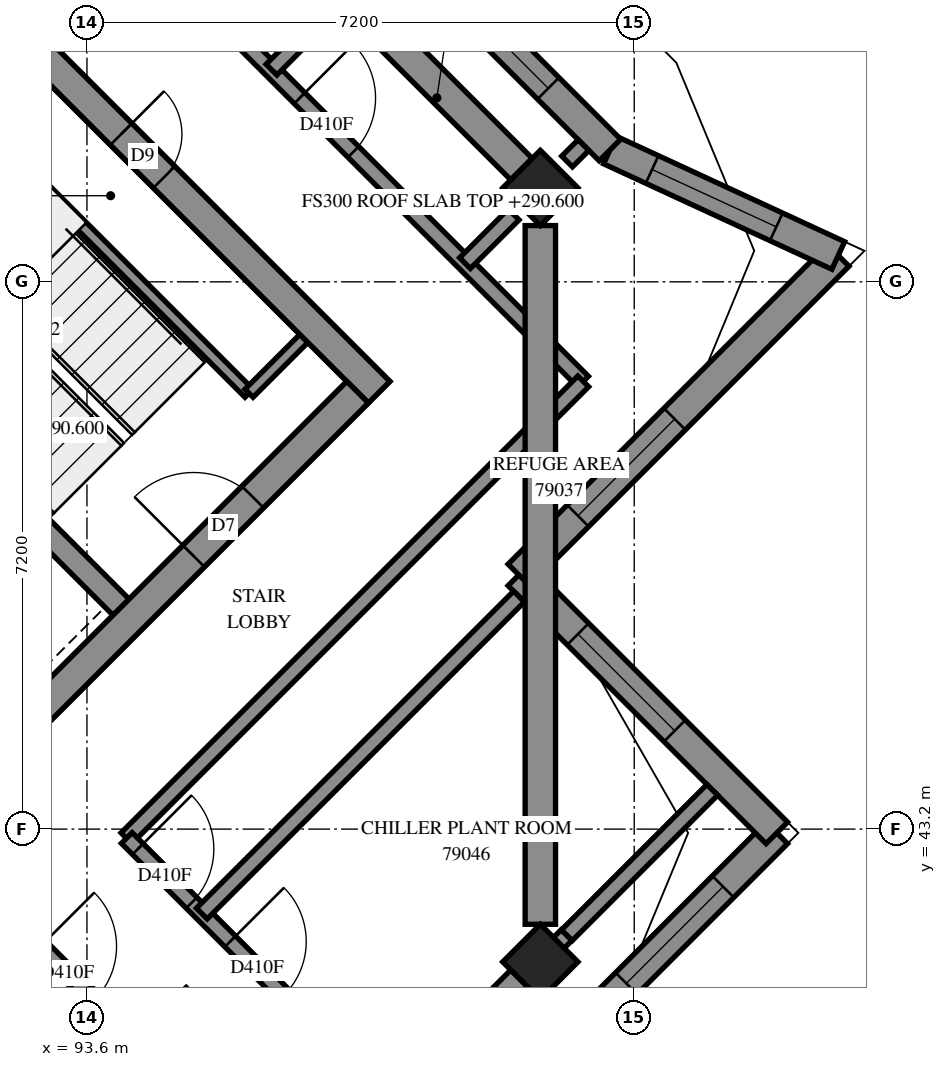
"""IFC4 building model, lengths in metres.
Left out: names, types, materials, properties, quantities, classifications, styles, units other than length and angle.
Written with IfcOpenShell. Run it as: python <this file> out.ifc"""

import sys

from ifc_helpers import new_model, si_unit, direction, frame, frame_2d, origin, origin_2d, place, context, subcontext, project, spatial, polyline, rectangle, outline, extrude, element, fill, save


model = new_model("IFC4")
c1 = context("Model", 3, precision=1e-05, world=origin(), true_north=direction((0.0, 1.0)))
c2 = subcontext(c1, "Body", "Model", "MODEL_VIEW")
j1 = project(units=[si_unit("LENGTHUNIT", "METRE"), si_unit("PLANEANGLEUNIT", "RADIAN")], contexts=[c1])
p1 = place(None, origin())
s1 = spatial("IfcSite", under=j1, at=p1, CompositionType="ELEMENT")
p2 = place(p1, origin())
s2 = spatial("IfcBuilding", under=s1, at=p2, CompositionType="ELEMENT")
p3 = place(p2, frame((0.0, 0.0, 290.6)))
s3 = spatial("IfcBuildingStorey", under=s2, at=p3, CompositionType="ELEMENT", Elevation=290.6)
for number, where, z_axis, x_axis in (
    (1, (99.565, 51.635, 0.0), (0.0, 0.0, 1.0), (0.707, -0.707, 0.0)),
    (2, (99.565, 41.453, 0.0), (0.0, 0.0, 1.0), (0.707, -0.707, 0.0)),
):
    element("IfcColumn", number, at=place(p3, frame(where, z_axis=z_axis, x_axis=x_axis)), inside=s3, PredefinedType="COLUMN", context=c2, shape_type="SweptSolid", body=[
        extrude(rectangle(XDim=0.7, YDim=0.7, at=origin_2d()), origin(), (0.0, 0.0, 1.0), 3.5),
    ])
p4 = place(p3, frame((86.695, 59.696, -0.3), z_axis=(0.0, 0.0, 1.0), x_axis=(0.7071100706, -0.7071034917, 0.0)))
e3 = element("IfcWall", 3, at=p4, inside=s3, PredefinedType="SHEAR", context=c2, shape_type="SweptSolid", body=[
    extrude(rectangle(XDim=15.2, YDim=0.4, at=frame_2d((7.6, 0.0))), origin(), (0.0, 0.0, 1.0), 3.1),
])
p5 = place(p4, frame((10.4, 0.0, 0.3)))
e4 = element("IfcOpeningElement", 4, at=p5, cuts=e3, PredefinedType="OPENING", context=c2, shape_type="SweptSolid", body=[
    extrude(rectangle(XDim=0.8, YDim=2.1, at=frame_2d((0.4, 1.05))), frame((0.0, 0.21, 0.0), z_axis=(0.0, -1.0, 0.0), x_axis=(1.0, 0.0, 0.0)), (0.0, 0.0, 1.0), 0.42),
])
p6 = place(p3, frame((86.978, 38.766, -0.3), z_axis=(0.0, 0.0, 1.0), x_axis=(0.7071067812, 0.7071067812, 0.0)))
e5 = element("IfcWall", 5, at=p6, inside=s3, PredefinedType="SHEAR", context=c2, shape_type="SweptSolid", body=[
    extrude(rectangle(XDim=14.4, YDim=0.4, at=frame_2d((7.2, 0.0))), origin(), (0.0, 0.0, 1.0), 3.1),
])
p7 = place(p6, frame((4.55, 0.0, 0.3)))
e6 = element("IfcOpeningElement", 6, at=p7, cuts=e5, PredefinedType="OPENING", context=c2, shape_type="SweptSolid", body=[
    extrude(rectangle(XDim=1.1, YDim=2.1, at=frame_2d((0.55, 1.05))), frame((0.0, 0.21, 0.0), z_axis=(0.0, -1.0, 0.0), x_axis=(1.0, 0.0, 0.0)), (0.0, 0.0, 1.0), 0.42),
])
p8 = place(p6, frame((11.35, 0.0, 0.3)))
e7 = element("IfcOpeningElement", 7, at=p8, cuts=e5, PredefinedType="OPENING", context=c2, shape_type="SweptSolid", body=[
    extrude(rectangle(XDim=1.1, YDim=2.1, at=frame_2d((0.55, 1.05))), frame((0.0, 0.21, 0.0), z_axis=(0.0, -1.0, 0.0), x_axis=(1.0, 0.0, 0.0)), (0.0, 0.0, 1.0), 0.42),
])
p9 = place(p3, frame((88.958, 51.211, 0.0), z_axis=(0.0, 0.0, 1.0), x_axis=(0.7070998367, -0.7071137256, 0.0)))
e8 = element("IfcWall", 8, at=p9, inside=s3, PredefinedType="SOLIDWALL", context=c2, shape_type="SweptSolid", body=[
    extrude(rectangle(XDim=7.2, YDim=0.3, at=frame_2d((3.6, 0.0))), origin(), (0.0, 0.0, 1.0), 3.5),
])
p10 = place(p3, frame((89.382, 29.856, 0.0), z_axis=(0.0, 0.0, 1.0), x_axis=(0.7071094407, 0.7071041216, 0.0)))
e9 = element("IfcWall", 9, at=p10, inside=s3, PredefinedType="SOLIDWALL", context=c2, shape_type="SweptSolid", body=[
    extrude(outline(polyline([(-0.2, -0.2), (19.0, -0.2), (18.6, 0.2), (0.2, 0.2), (-0.2, -0.2)])), origin(), (0.0, 0.0, 1.0), 3.0),
])
p11 = place(p10, frame((1.9, 0.0, 0.7)))
e10 = element("IfcOpeningElement", 10, at=p11, cuts=e9, PredefinedType="OPENING", context=c2, shape_type="SweptSolid", body=[
    extrude(rectangle(XDim=1.8, YDim=2.2, at=frame_2d((0.9, 1.1))), frame((0.0, 0.21, 0.0), z_axis=(0.0, -1.0, 0.0), x_axis=(1.0, 0.0, 0.0)), (0.0, 0.0, 1.0), 0.42),
])
p12 = place(p10, frame((5.5, 0.0, 0.7)))
e11 = element("IfcOpeningElement", 11, at=p12, cuts=e9, PredefinedType="OPENING", context=c2, shape_type="SweptSolid", body=[
    extrude(rectangle(XDim=1.8, YDim=2.2, at=frame_2d((0.9, 1.1))), frame((0.0, 0.21, 0.0), z_axis=(0.0, -1.0, 0.0), x_axis=(1.0, 0.0, 0.0)), (0.0, 0.0, 1.0), 0.42),
])
p13 = place(p10, frame((8.95, 0.0, 0.7)))
e12 = element("IfcOpeningElement", 12, at=p13, cuts=e9, PredefinedType="OPENING", context=c2, shape_type="SweptSolid", body=[
    extrude(rectangle(XDim=1.8, YDim=2.2, at=frame_2d((0.9, 1.1))), frame((0.0, 0.21, 0.0), z_axis=(0.0, -1.0, 0.0), x_axis=(1.0, 0.0, 0.0)), (0.0, 0.0, 1.0), 0.42),
])
p14 = place(p10, frame((12.85, 0.0, 0.7)))
e13 = element("IfcOpeningElement", 13, at=p14, cuts=e9, PredefinedType="OPENING", context=c2, shape_type="SweptSolid", body=[
    extrude(rectangle(XDim=1.8, YDim=2.2, at=frame_2d((0.9, 1.1))), frame((0.0, 0.21, 0.0), z_axis=(0.0, -1.0, 0.0), x_axis=(1.0, 0.0, 0.0)), (0.0, 0.0, 1.0), 0.42),
])
p15 = place(p10, frame((16.0, 0.0, 0.7)))
e14 = element("IfcOpeningElement", 14, at=p15, cuts=e9, PredefinedType="OPENING", context=c2, shape_type="SweptSolid", body=[
    extrude(rectangle(XDim=1.8, YDim=2.2, at=frame_2d((0.9, 1.1))), frame((0.0, 0.21, 0.0), z_axis=(0.0, -1.0, 0.0), x_axis=(1.0, 0.0, 0.0)), (0.0, 0.0, 1.0), 0.42),
])
p16 = place(p3, frame((102.676, 43.15, 0.0), z_axis=(0.0, 0.0, 1.0), x_axis=(-0.7070963646, 0.7071171977, 0.0)))
e15 = element("IfcWall", 15, at=p16, inside=s3, PredefinedType="SOLIDWALL", context=c2, shape_type="SweptSolid", body=[
    extrude(outline(polyline([(-0.2, -0.2), (4.6, -0.2), (5.0, 0.2), (0.2, 0.2), (-0.2, -0.2)])), origin(), (0.0, 0.0, 1.0), 3.5),
])
p17 = place(p16, frame((1.9, 0.0, 0.7)))
e16 = element("IfcOpeningElement", 16, at=p17, cuts=e15, PredefinedType="OPENING", context=c2, shape_type="SweptSolid", body=[
    extrude(rectangle(XDim=1.8, YDim=2.2, at=frame_2d((0.9, 1.1))), frame((0.0, 0.21, 0.0), z_axis=(0.0, -1.0, 0.0), x_axis=(1.0, 0.0, 0.0)), (0.0, 0.0, 1.0), 0.42),
])
p18 = place(p3, frame((99.282, 46.544, 0.0), z_axis=(0.0, 0.0, 1.0), x_axis=(0.7071067812, 0.7071067812, 0.0)))
e17 = element("IfcWall", 17, at=p18, inside=s3, PredefinedType="SOLIDWALL", context=c2, shape_type="SweptSolid", body=[
    extrude(outline(polyline([(0.2, -0.2), (6.23, -0.2), (5.657, 0.2), (-0.2, 0.2), (0.2, -0.2)])), origin(), (0.0, 0.0, 1.0), 3.5),
])
p19 = place(p18, frame((1.1, 0.0, 0.7)))
e18 = element("IfcOpeningElement", 18, at=p19, cuts=e17, PredefinedType="OPENING", context=c2, shape_type="SweptSolid", body=[
    extrude(rectangle(XDim=1.8, YDim=2.2, at=frame_2d((0.9, 1.1))), frame((0.0, 0.21, 0.0), z_axis=(0.0, -1.0, 0.0), x_axis=(1.0, 0.0, 0.0)), (0.0, 0.0, 1.0), 0.42),
])
p20 = place(p3, frame((103.484, 50.747, 0.0), z_axis=(0.0, 0.0, 1.0), x_axis=(-0.9078558767, 0.4192823716, 0.0)))
e19 = element("IfcWall", 19, at=p20, inside=s3, PredefinedType="SOLIDWALL", context=c2, shape_type="SweptSolid", body=[
    extrude(outline(polyline([(-0.287, -0.2), (3.273, -0.2), (3.345, 0.2), (0.287, 0.2), (-0.287, -0.2)])), origin(), (0.0, 0.0, 1.0), 3.5),
])
p21 = place(p20, frame((0.898, 0.0, 0.7)))
e20 = element("IfcOpeningElement", 20, at=p21, cuts=e19, PredefinedType="OPENING", context=c2, shape_type="SweptSolid", body=[
    extrude(rectangle(XDim=1.8, YDim=2.2, at=frame_2d((0.9, 1.1))), frame((0.0, 0.21, 0.0), z_axis=(0.0, -1.0, 0.0), x_axis=(1.0, 0.0, 0.0)), (0.0, 0.0, 1.0), 0.42),
])
p22 = place(p3, frame((100.48, 52.134, 0.0), z_axis=(0.0, 0.0, 1.0), x_axis=(-0.7071067812, 0.7071067812, 0.0)))
e21 = element("IfcWall", 21, at=p22, inside=s3, PredefinedType="SOLIDWALL", context=c2, shape_type="SweptSolid", body=[
    extrude(outline(polyline([(0.036, -0.2), (6.718, -0.2), (6.718, 0.2), (-0.036, 0.2), (0.036, -0.2)])), origin(), (0.0, 0.0, 1.0), 3.5),
])
p23 = place(p22, frame((1.147, 0.0, 0.7)))
e22 = element("IfcOpeningElement", 22, at=p23, cuts=e21, PredefinedType="OPENING", context=c2, shape_type="SweptSolid", body=[
    extrude(rectangle(XDim=1.8, YDim=2.2, at=frame_2d((0.9, 1.1))), frame((0.0, 0.21, 0.0), z_axis=(0.0, -1.0, 0.0), x_axis=(1.0, 0.0, 0.0)), (0.0, 0.0, 1.0), 0.42),
])
p24 = place(p22, frame((4.306, 0.0, 0.7)))
e23 = element("IfcOpeningElement", 23, at=p24, cuts=e21, PredefinedType="OPENING", context=c2, shape_type="SweptSolid", body=[
    extrude(rectangle(XDim=1.8, YDim=2.2, at=frame_2d((0.9, 1.1))), frame((0.0, 0.21, 0.0), z_axis=(0.0, -1.0, 0.0), x_axis=(1.0, 0.0, 0.0)), (0.0, 0.0, 1.0), 0.42),
])
p25 = place(p3, frame((91.313, 53.354, 0.0), z_axis=(0.0, 0.0, 1.0), x_axis=(0.7071147811, -0.7070987812, 0.0)))
e24 = element("IfcWall", 24, at=p25, inside=s3, PredefinedType="PARTITIONING", context=c2, shape_type="SweptSolid", body=[
    extrude(rectangle(XDim=6.25, YDim=0.15, at=frame_2d((3.125, 0.0))), origin(), (0.0, 0.0, 1.0), 3.5),
])
p26 = place(p3, frame((95.732, 48.934, 0.0), z_axis=(0.0, 0.0, 1.0), x_axis=(0.7071067812, 0.7071067812, 0.0)))
e25 = element("IfcWall", 25, at=p26, inside=s3, PredefinedType="PARTITIONING", context=c2, shape_type="SweptSolid", body=[
    extrude(rectangle(XDim=1.02, YDim=0.15, at=frame_2d((0.51, 0.0))), origin(), (0.0, 0.0, 1.0), 3.5),
])
p27 = place(p3, frame((86.833, 62.381, 0.0), z_axis=(0.0, 0.0, 1.0), x_axis=(0.7071067812, -0.7071067812, 0.0)))
e26 = element("IfcWall", 26, at=p27, inside=s3, PredefinedType="PARTITIONING", context=c2, shape_type="SweptSolid", body=[
    extrude(rectangle(XDim=18.801, YDim=0.2, at=frame_2d((9.4, 0.0))), origin(), (0.0, 0.0, 1.0), 3.5),
])
p28 = place(p27, frame((4.276, 0.0, 0.0)))
e27 = element("IfcOpeningElement", 27, at=p28, cuts=e26, PredefinedType="OPENING", context=c2, shape_type="SweptSolid", body=[
    extrude(rectangle(XDim=1.0, YDim=2.1, at=frame_2d((0.5, 1.05))), frame((0.0, 0.11, 0.0), z_axis=(0.0, -1.0, 0.0), x_axis=(1.0, 0.0, 0.0)), (0.0, 0.0, 1.0), 0.22),
])
p29 = place(p27, frame((6.326, 0.0, 0.0)))
e28 = element("IfcOpeningElement", 28, at=p29, cuts=e26, PredefinedType="OPENING", context=c2, shape_type="SweptSolid", body=[
    extrude(rectangle(XDim=1.0, YDim=2.1, at=frame_2d((0.5, 1.05))), frame((0.0, 0.11, 0.0), z_axis=(0.0, -1.0, 0.0), x_axis=(1.0, 0.0, 0.0)), (0.0, 0.0, 1.0), 0.22),
])
p30 = place(p27, frame((11.476, 0.0, 0.0)))
e29 = element("IfcOpeningElement", 29, at=p30, cuts=e26, PredefinedType="OPENING", context=c2, shape_type="SweptSolid", body=[
    extrude(rectangle(XDim=1.0, YDim=2.1, at=frame_2d((0.5, 1.05))), frame((0.0, 0.11, 0.0), z_axis=(0.0, -1.0, 0.0), x_axis=(1.0, 0.0, 0.0)), (0.0, 0.0, 1.0), 0.22),
])
p31 = place(p27, frame((13.526, 0.0, 0.0)))
e30 = element("IfcOpeningElement", 30, at=p31, cuts=e26, PredefinedType="OPENING", context=c2, shape_type="SweptSolid", body=[
    extrude(rectangle(XDim=1.0, YDim=2.1, at=frame_2d((0.5, 1.05))), frame((0.0, 0.11, 0.0), z_axis=(0.0, -1.0, 0.0), x_axis=(1.0, 0.0, 0.0)), (0.0, 0.0, 1.0), 0.22),
])
p32 = place(p3, frame((94.12, 43.081, 0.0), z_axis=(0.0, 0.0, 1.0), x_axis=(0.7071067812, 0.7071067812, 0.0)))
e31 = element("IfcWall", 31, at=p32, inside=s3, PredefinedType="PARTITIONING", context=c2, shape_type="SweptSolid", body=[
    extrude(rectangle(XDim=8.499, YDim=0.2, at=frame_2d((4.25, 0.0))), origin(), (0.0, 0.0, 1.0), 3.5),
])
p33 = place(p3, frame((94.124, 43.084, 0.0), z_axis=(0.0, 0.0, 1.0), x_axis=(0.7071067812, -0.7071067812, 0.0)))
e32 = element("IfcWall", 32, at=p33, inside=s3, PredefinedType="PARTITIONING", context=c2, shape_type="SweptSolid", body=[
    extrude(rectangle(XDim=5.001, YDim=0.2, at=frame_2d((2.5, 0.0))), origin(), (0.0, 0.0, 1.0), 3.5),
])
p34 = place(p33, frame((0.206, 0.0, 0.0)))
e33 = element("IfcOpeningElement", 33, at=p34, cuts=e32, PredefinedType="OPENING", context=c2, shape_type="SweptSolid", body=[
    extrude(rectangle(XDim=1.0, YDim=2.1, at=frame_2d((0.5, 1.05))), frame((0.0, 0.11, 0.0), z_axis=(0.0, -1.0, 0.0), x_axis=(1.0, 0.0, 0.0)), (0.0, 0.0, 1.0), 0.22),
])
p35 = place(p33, frame((1.925, 0.0, 0.0)))
e34 = element("IfcOpeningElement", 34, at=p35, cuts=e32, PredefinedType="OPENING", context=c2, shape_type="SweptSolid", body=[
    extrude(rectangle(XDim=1.0, YDim=2.1, at=frame_2d((0.5, 1.05))), frame((0.0, 0.11, 0.0), z_axis=(0.0, -1.0, 0.0), x_axis=(1.0, 0.0, 0.0)), (0.0, 0.0, 1.0), 0.22),
])
p36 = place(p3, frame((92.845, 41.803, 0.0), z_axis=(0.0, 0.0, 1.0), x_axis=(0.7071067812, -0.7071067812, 0.0)))
e35 = element("IfcWall", 35, at=p36, inside=s3, PredefinedType="PARTITIONING", context=c2, shape_type="SweptSolid", body=[
    extrude(rectangle(XDim=4.998, YDim=0.2, at=frame_2d((2.499, 0.0))), origin(), (0.0, 0.0, 1.0), 3.5),
])
p37 = place(p36, frame((0.205, 0.0, 0.0)))
e36 = element("IfcOpeningElement", 36, at=p37, cuts=e35, PredefinedType="OPENING", context=c2, shape_type="SweptSolid", body=[
    extrude(rectangle(XDim=1.0, YDim=2.1, at=frame_2d((0.5, 1.05))), frame((0.0, 0.11, 0.0), z_axis=(0.0, -1.0, 0.0), x_axis=(1.0, 0.0, 0.0)), (0.0, 0.0, 1.0), 0.22),
])
p38 = place(p36, frame((1.924, 0.0, 0.0)))
e37 = element("IfcOpeningElement", 37, at=p38, cuts=e35, PredefinedType="OPENING", context=c2, shape_type="SweptSolid", body=[
    extrude(rectangle(XDim=1.0, YDim=2.1, at=frame_2d((0.5, 1.05))), frame((0.0, 0.11, 0.0), z_axis=(0.0, -1.0, 0.0), x_axis=(1.0, 0.0, 0.0)), (0.0, 0.0, 1.0), 0.22),
])
p39 = place(p3, frame((97.653, 39.547, 0.0), z_axis=(0.0, 0.0, 1.0), x_axis=(0.7066684208, 0.70754487, 0.0)))
e38 = element("IfcWall", 38, at=p39, inside=s3, PredefinedType="PARTITIONING", context=c2, shape_type="SweptSolid", body=[
    extrude(rectangle(XDim=3.195, YDim=0.2, at=frame_2d((1.597, 0.0))), origin(), (0.0, 0.0, 1.0), 3.0),
])
p40 = place(p3, frame((98.574, 50.646, 0.0), z_axis=(0.0, 0.0, 1.0), x_axis=(0.7071067812, 0.7071067812, 0.0)))
e39 = element("IfcWall", 39, at=p40, inside=s3, PredefinedType="PARTITIONING", context=c2, shape_type="SweptSolid", body=[
    extrude(rectangle(XDim=0.905, YDim=0.2, at=frame_2d((0.453, 0.0))), origin(), (0.0, 0.0, 1.0), 3.5),
])
p41 = place(p3, frame((95.111, 42.089, 0.0), z_axis=(0.0, 0.0, 1.0), x_axis=(0.7072762658, 0.7069372559, 0.0)))
e40 = element("IfcWall", 40, at=p41, inside=s3, PredefinedType="PARTITIONING", context=c2, shape_type="SweptSolid", body=[
    extrude(outline(polyline([(0.0, -0.1), (5.899, -0.1), (5.899, 0.1), (0.0, 0.1), (0.0, -0.1)])), origin(), (0.0, 0.0, 1.0), 3.5),
])
p42 = place(p3, frame((99.914, 41.804, 0.0), z_axis=(0.0, 0.0, 1.0), x_axis=(0.7071067812, 0.7071067812, 0.0)))
e41 = element("IfcWall", 41, at=p42, inside=s3, PredefinedType="PARTITIONING", context=c2, shape_type="SweptSolid", body=[
    extrude(outline(polyline([(0.0, -0.1), (2.705, -0.1), (2.705, 0.1), (0.0, 0.1), (0.0, -0.1)])), origin(), (0.0, 0.0, 1.0), 3.5),
])
p43 = place(p3, frame((96.028, 53.192, 0.0), z_axis=(0.0, 0.0, 1.0), x_axis=(0.7066975891, 0.7075157366, 0.0)))
e42 = element("IfcWall", 42, at=p43, inside=s3, PredefinedType="PARTITIONING", context=c2, shape_type="SweptSolid", body=[
    extrude(outline(polyline([(0.0, -0.1), (2.2, -0.1), (2.2, 0.1), (0.0, 0.1), (0.0, -0.1)])), origin(), (0.0, 0.0, 1.0), 3.5),
])
p44 = place(p3, frame((99.917, 51.983, 0.0), z_axis=(0.0, 0.0, 1.0), x_axis=(0.7087439748, 0.7054657881, 0.0)))
e43 = element("IfcWall", 43, at=p44, inside=s3, PredefinedType="PARTITIONING", context=c2, shape_type="SweptSolid", body=[
    extrude(outline(polyline([(0.0, -0.1), (0.305, -0.1), (0.305, 0.1), (0.0, 0.1), (0.0, -0.1)])), origin(), (0.0, 0.0, 1.0), 3.5),
])
p45 = place(p15, origin())
e44 = element("IfcWindow", 44, at=p45, inside=s3, PartitioningType="SINGLE_PANEL", PredefinedType="WINDOW", context=c2, shape_type="SweptSolid", body=[
    extrude(rectangle(XDim=1.8, YDim=2.2, at=frame_2d((0.9, 1.1))), frame((0.0, 0.08, 0.0), z_axis=(0.0, -1.0, 0.0), x_axis=(1.0, 0.0, 0.0)), (0.0, 0.0, 1.0), 0.06),
])
fill(e14, e44)
p46 = place(p17, origin())
e45 = element("IfcWindow", 45, at=p46, inside=s3, PartitioningType="SINGLE_PANEL", PredefinedType="WINDOW", context=c2, shape_type="SweptSolid", body=[
    extrude(rectangle(XDim=1.8, YDim=2.2, at=frame_2d((0.9, 1.1))), frame((0.0, 0.08, 0.0), z_axis=(0.0, -1.0, 0.0), x_axis=(1.0, 0.0, 0.0)), (0.0, 0.0, 1.0), 0.06),
])
fill(e16, e45)
p47 = place(p19, origin())
e46 = element("IfcWindow", 46, at=p47, inside=s3, PartitioningType="SINGLE_PANEL", PredefinedType="WINDOW", context=c2, shape_type="SweptSolid", body=[
    extrude(rectangle(XDim=1.8, YDim=2.2, at=frame_2d((0.9, 1.1))), frame((0.0, 0.08, 0.0), z_axis=(0.0, -1.0, 0.0), x_axis=(1.0, 0.0, 0.0)), (0.0, 0.0, 1.0), 0.06),
])
fill(e18, e46)
p48 = place(p21, origin())
e47 = element("IfcWindow", 47, at=p48, inside=s3, PartitioningType="SINGLE_PANEL", PredefinedType="WINDOW", context=c2, shape_type="SweptSolid", body=[
    extrude(rectangle(XDim=1.8, YDim=2.2, at=frame_2d((0.9, 1.1))), frame((0.0, 0.08, 0.0), z_axis=(0.0, -1.0, 0.0), x_axis=(1.0, 0.0, 0.0)), (0.0, 0.0, 1.0), 0.06),
])
fill(e20, e47)
p49 = place(p23, origin())
e48 = element("IfcWindow", 48, at=p49, inside=s3, PartitioningType="SINGLE_PANEL", PredefinedType="WINDOW", context=c2, shape_type="SweptSolid", body=[
    extrude(rectangle(XDim=1.8, YDim=2.2, at=frame_2d((0.9, 1.1))), frame((0.0, 0.08, 0.0), z_axis=(0.0, -1.0, 0.0), x_axis=(1.0, 0.0, 0.0)), (0.0, 0.0, 1.0), 0.06),
])
fill(e22, e48)
p50 = place(p5, origin())
e49 = element("IfcDoor", 49, at=p50, inside=s3, OperationType="SINGLE_SWING_RIGHT", PredefinedType="DOOR", context=c2, shape_type="SweptSolid", body=[
    extrude(rectangle(XDim=0.8, YDim=2.1, at=frame_2d((0.4, 1.05))), frame((0.0, 0.025, 0.0), z_axis=(0.0, -1.0, 0.0), x_axis=(1.0, 0.0, 0.0)), (0.0, 0.0, 1.0), 0.05),
])
fill(e4, e49)
p51 = place(p8, origin())
e50 = element("IfcDoor", 50, at=p51, inside=s3, OperationType="SINGLE_SWING_RIGHT", PredefinedType="DOOR", context=c2, shape_type="SweptSolid", body=[
    extrude(rectangle(XDim=1.1, YDim=2.1, at=frame_2d((0.55, 1.05))), frame((0.0, 0.025, 0.0), z_axis=(0.0, -1.0, 0.0), x_axis=(1.0, 0.0, 0.0)), (0.0, 0.0, 1.0), 0.05),
])
fill(e7, e50)
p52 = place(p34, origin())
e51 = element("IfcDoor", 51, at=p52, inside=s3, OperationType="SINGLE_SWING_LEFT", PredefinedType="DOOR", context=c2, shape_type="SweptSolid", body=[
    extrude(rectangle(XDim=1.0, YDim=2.1, at=frame_2d((0.5, 1.05))), frame((0.0, 0.025, 0.0), z_axis=(0.0, -1.0, 0.0), x_axis=(1.0, 0.0, 0.0)), (0.0, 0.0, 1.0), 0.05),
])
fill(e33, e51)
p53 = place(p31, origin())
e52 = element("IfcDoor", 52, at=p53, inside=s3, OperationType="SINGLE_SWING_RIGHT", PredefinedType="DOOR", context=c2, shape_type="SweptSolid", body=[
    extrude(rectangle(XDim=1.0, YDim=2.1, at=frame_2d((0.5, 1.05))), frame((0.0, 0.025, 0.0), z_axis=(0.0, -1.0, 0.0), x_axis=(1.0, 0.0, 0.0)), (0.0, 0.0, 1.0), 0.05),
])
fill(e30, e52)
p54 = place(p37, origin())
e53 = element("IfcDoor", 53, at=p54, inside=s3, OperationType="SINGLE_SWING_RIGHT", PredefinedType="DOOR", context=c2, shape_type="SweptSolid", body=[
    extrude(rectangle(XDim=1.0, YDim=2.1, at=frame_2d((0.5, 1.05))), frame((0.0, 0.025, 0.0), z_axis=(0.0, -1.0, 0.0), x_axis=(1.0, 0.0, 0.0)), (0.0, 0.0, 1.0), 0.05),
])
fill(e36, e53)
p55 = place(p35, origin())
e54 = element("IfcDoor", 54, at=p55, inside=s3, OperationType="SINGLE_SWING_RIGHT", PredefinedType="DOOR", context=c2, shape_type="SweptSolid", body=[
    extrude(rectangle(XDim=1.0, YDim=2.1, at=frame_2d((0.5, 1.05))), frame((0.0, 0.025, 0.0), z_axis=(0.0, -1.0, 0.0), x_axis=(1.0, 0.0, 0.0)), (0.0, 0.0, 1.0), 0.05),
])
fill(e34, e54)
save(model, sys.argv[1])
